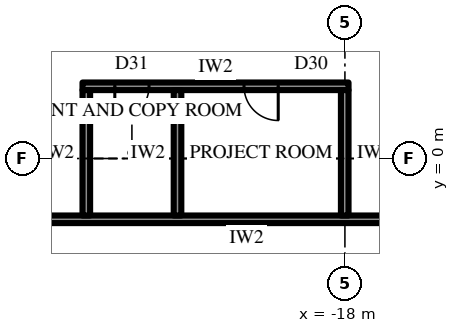
"""IFC4 building model, lengths in metres.
Left out: names, types, materials, properties, quantities, classifications, styles, units other than length and angle.
Written with IfcOpenShell. Run it as: python <this file> out.ifc"""

import sys

from ifc_helpers import new_model, si_unit, direction, frame, frame_2d, origin, place, context, subcontext, project, spatial, rectangle, extrude, element, fill, save


model = new_model("IFC4")
c1 = context("Model", 3, precision=1e-05, world=origin(), true_north=direction((0.0, 1.0)))
c2 = subcontext(c1, "Body", "Model", "MODEL_VIEW")
j1 = project(units=[si_unit("LENGTHUNIT", "METRE"), si_unit("PLANEANGLEUNIT", "RADIAN")], contexts=[c1])
p1 = place(None, origin())
s1 = spatial("IfcSite", under=j1, at=p1, CompositionType="ELEMENT")
p2 = place(p1, origin())
s2 = spatial("IfcBuilding", under=s1, at=p2, CompositionType="ELEMENT")
p3 = place(p2, frame((0.0, 0.0, 328.3)))
s3 = spatial("IfcBuildingStorey", under=s2, at=p3, CompositionType="ELEMENT", Elevation=328.3)
p4 = place(p3, frame((-29.459, -2.175, 0.0), z_axis=(0.0, 0.0, 1.0), x_axis=(0.499996453679, -0.866027451244, 0.0)))
e1 = element("IfcWall", 1, at=p4, inside=s3, PredefinedType="SOLIDWALL", context=c2, shape_type="SweptSolid", body=[
    extrude(rectangle(XDim=9.564, YDim=0.3, at=frame_2d((4.782, 0.0))), origin(), (0.0, 0.0, 1.0), 2.9),
])
p5 = place(p4, frame((0.866, 0.0, 0.6)))
e2 = element("IfcOpeningElement", 2, at=p5, cuts=e1, PredefinedType="OPENING", context=c2, shape_type="SweptSolid", body=[
    extrude(rectangle(XDim=2.55, YDim=2.05, at=frame_2d((1.275, 1.025))), frame((0.0, 0.16, 0.0), z_axis=(0.0, -1.0, 0.0), x_axis=(1.0, 0.0, 0.0)), (0.0, 0.0, 1.0), 0.32),
])
p6 = place(p4, frame((5.823, 0.0, 0.0)))
e3 = element("IfcOpeningElement", 3, at=p6, cuts=e1, PredefinedType="OPENING", context=c2, shape_type="SweptSolid", body=[
    extrude(rectangle(XDim=1.2, YDim=2.4, at=frame_2d((0.6, 1.2))), frame((0.0, 0.16, 0.0), z_axis=(0.0, -1.0, 0.0), x_axis=(1.0, 0.0, 0.0)), (0.0, 0.0, 1.0), 0.32),
])
p7 = place(p3, frame((-12.425, -1.6, 0.0), z_axis=(0.0, 0.0, 1.0), x_axis=(-1.0, 0.0, 0.0)))
e4 = element("IfcWall", 4, at=p7, inside=s3, PredefinedType="PARTITIONING", context=c2, shape_type="SweptSolid", body=[
    extrude(rectangle(XDim=16.327, YDim=0.2, at=frame_2d((8.164, 0.0))), origin(), (0.0, 0.0, 1.0), 4.0),
])
p8 = place(p7, frame((1.133, 0.0, 0.0)))
e5 = element("IfcOpeningElement", 5, at=p8, cuts=e4, PredefinedType="OPENING", context=c2, shape_type="SweptSolid", body=[
    extrude(rectangle(XDim=1.0, YDim=2.2, at=frame_2d((0.5, 1.1))), frame((0.0, 0.11, 0.0), z_axis=(0.0, -1.0, 0.0), x_axis=(1.0, 0.0, 0.0)), (0.0, 0.0, 1.0), 0.22),
])
p9 = place(p3, frame((-17.905, 1.9, 0.0), z_axis=(0.0, 0.0, 1.0), x_axis=(-1.0, 0.0, 0.0)))
e6 = element("IfcWall", 6, at=p9, inside=s3, PredefinedType="PARTITIONING", context=c2, shape_type="SweptSolid", body=[
    extrude(rectangle(XDim=7.0, YDim=0.2, at=frame_2d((3.5, 0.0))), origin(), (0.0, 0.0, 1.0), 4.0),
])
p10 = place(p9, frame((1.85, 0.0, 0.0)))
e7 = element("IfcOpeningElement", 7, at=p10, cuts=e6, PredefinedType="OPENING", context=c2, shape_type="SweptSolid", body=[
    extrude(rectangle(XDim=0.9, YDim=2.2, at=frame_2d((0.45, 1.1))), frame((0.0, 0.11, 0.0), z_axis=(0.0, -1.0, 0.0), x_axis=(1.0, 0.0, 0.0)), (0.0, 0.0, 1.0), 0.22),
])
p11 = place(p9, frame((5.25, 0.0, 0.0)))
e8 = element("IfcOpeningElement", 8, at=p11, cuts=e6, PredefinedType="OPENING", context=c2, shape_type="SweptSolid", body=[
    extrude(rectangle(XDim=0.9, YDim=2.2, at=frame_2d((0.45, 1.1))), frame((0.0, 0.11, 0.0), z_axis=(0.0, -1.0, 0.0), x_axis=(1.0, 0.0, 0.0)), (0.0, 0.0, 1.0), 0.22),
])
for number, where, z_axis, x_axis in (
    (9, (-18.005, -1.5, 0.0), (0.0, 0.0, 1.0), (0.0, 1.0, 0.0)),
    (10, (-22.405, -1.5, 0.0), (0.0, 0.0, 1.0), (0.0, 1.0, 0.0)),
    (11, (-24.805, -1.5, 0.0), (0.0, 0.0, 1.0), (0.0, 1.0, 0.0)),
):
    element("IfcWall", number, at=place(p3, frame(where, z_axis=z_axis, x_axis=x_axis)), inside=s3, PredefinedType="PARTITIONING", context=c2, shape_type="SweptSolid", body=[
        extrude(rectangle(XDim=3.3, YDim=0.2, at=frame_2d((1.65, 0.0))), origin(), (0.0, 0.0, 1.0), 4.0),
    ])
p12 = place(p10, origin())
e12 = element("IfcDoor", 12, at=p12, inside=s3, OperationType="SINGLE_SWING_RIGHT", PredefinedType="DOOR", context=c2, shape_type="SweptSolid", body=[
    extrude(rectangle(XDim=0.9, YDim=2.2, at=frame_2d((0.45, 1.1))), frame((0.0, 0.025, 0.0), z_axis=(0.0, -1.0, 0.0), x_axis=(1.0, 0.0, 0.0)), (0.0, 0.0, 1.0), 0.05),
])
fill(e7, e12)
p13 = place(p11, origin())
e13 = element("IfcDoor", 13, at=p13, inside=s3, OperationType="SINGLE_SWING_LEFT", PredefinedType="DOOR", context=c2, shape_type="SweptSolid", body=[
    extrude(rectangle(XDim=0.9, YDim=2.2, at=frame_2d((0.45, 1.1))), frame((0.0, 0.025, 0.0), z_axis=(0.0, -1.0, 0.0), x_axis=(1.0, 0.0, 0.0)), (0.0, 0.0, 1.0), 0.05),
])
fill(e8, e13)
save(model, sys.argv[1])
